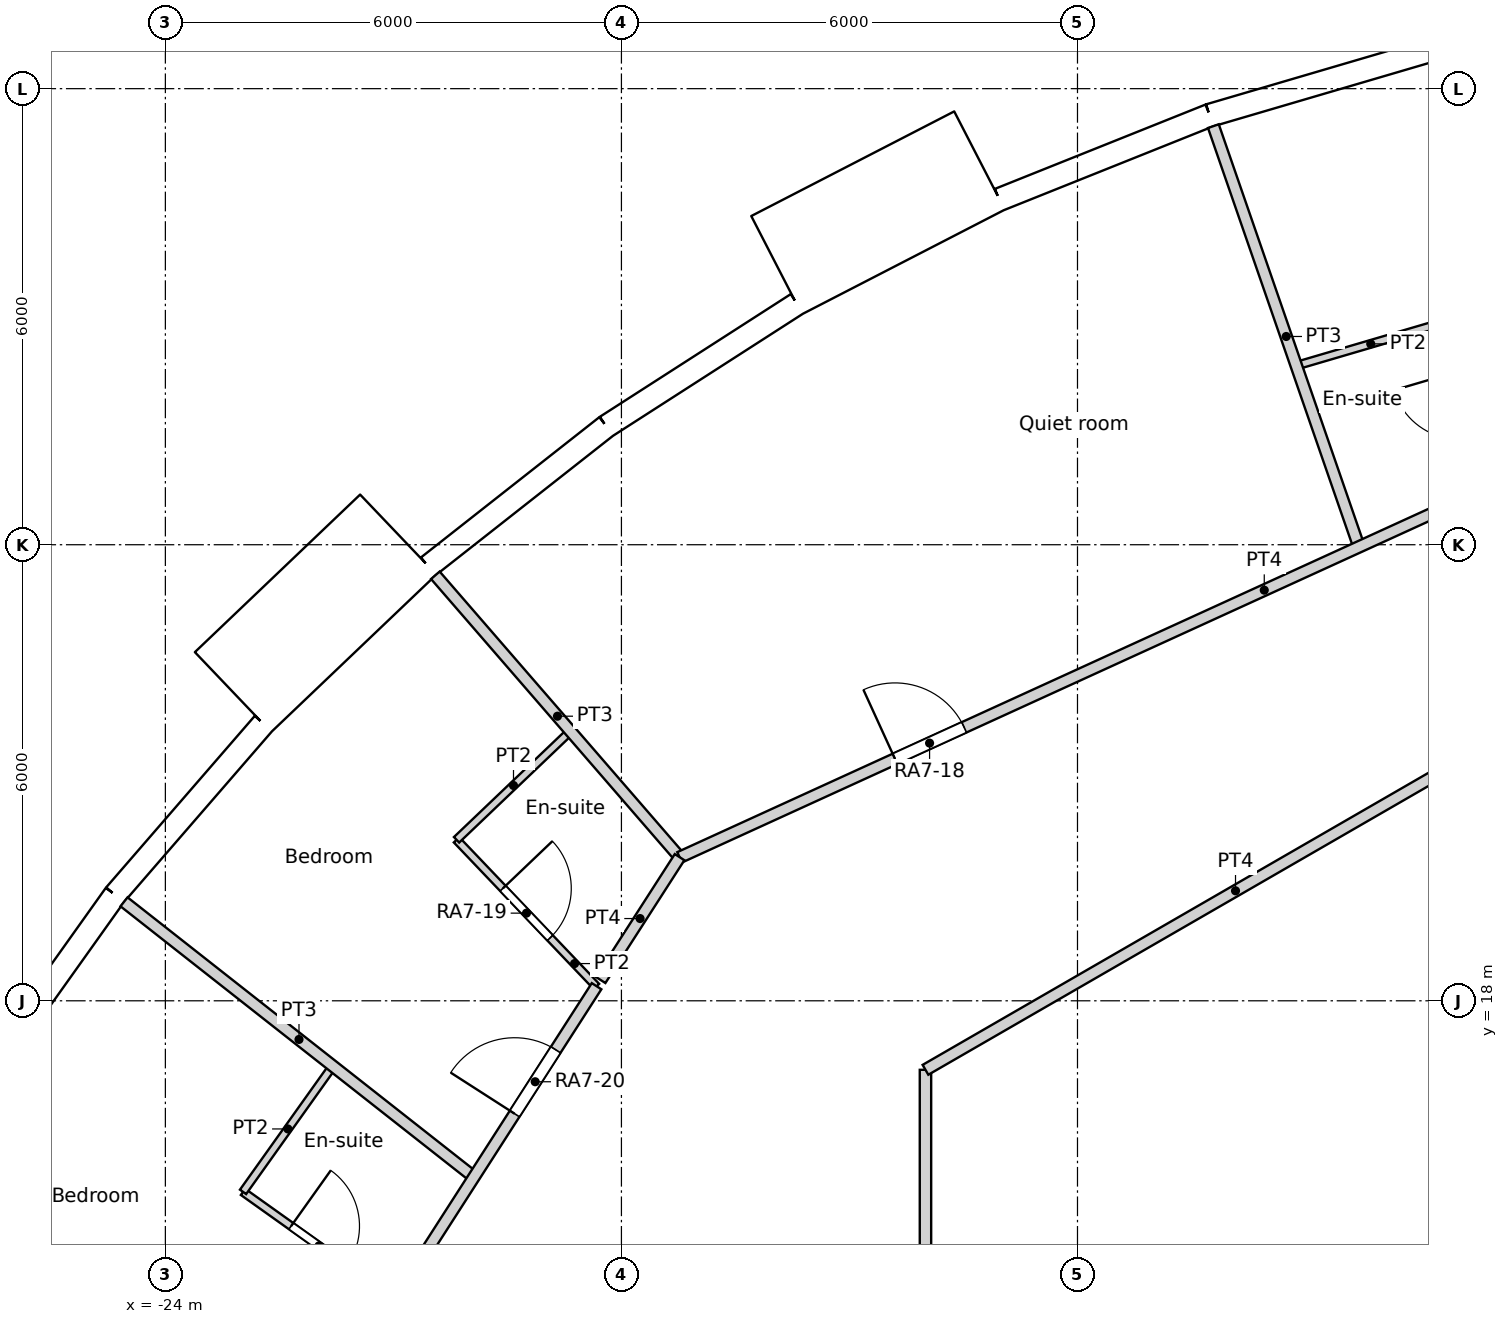
"""IFC4 building model, lengths in metres.
Left out: names, types, materials, properties, quantities, classifications, styles, units other than length and angle.
Written with IfcOpenShell. Run it as: python <this file> out.ifc"""

import sys

from ifc_helpers import new_model, si_unit, direction, frame, frame_2d, origin, origin_2d, place, context, subcontext, project, spatial, rectangle, circle, extrude, element, fill, save


model = new_model("IFC4")
c1 = context("Model", 3, precision=1e-05, world=origin(), true_north=direction((0.0, 1.0)))
c2 = subcontext(c1, "Body", "Model", "MODEL_VIEW")
j1 = project(units=[si_unit("LENGTHUNIT", "METRE"), si_unit("PLANEANGLEUNIT", "RADIAN")], contexts=[c1])
p1 = place(None, origin())
s1 = spatial("IfcSite", under=j1, at=p1, CompositionType="ELEMENT")
p2 = place(p1, origin())
s2 = spatial("IfcBuilding", under=s1, at=p2, CompositionType="ELEMENT")
p3 = place(p2, frame((0.0, 0.0, 93.0)))
s3 = spatial("IfcBuildingStorey", under=s2, at=p3, CompositionType="ELEMENT", Elevation=93.0)
for number, where, z_axis, x_axis in (
    (1, (-9.902, 28.61, 0.0), (0.0, 0.0, 1.0), (1.0, 0.0, 0.0)),
    (2, (-15.137, 26.219, 0.0), (0.0, 0.0, 1.0), (1.0, 0.0, 0.0)),
    (3, (-19.826, 22.88, 0.0), (0.0, 0.0, 1.0), (1.0, 0.0, 0.0)),
    (4, (-23.797, 18.715, 0.0), (0.0, 0.0, 1.0), (1.0, 0.0, 0.0)),
):
    element("IfcColumn", number, at=place(p3, frame(where, z_axis=z_axis, x_axis=x_axis)), inside=s3, PredefinedType="COLUMN", context=c2, shape_type="SweptSolid", body=[
        extrude(circle(Radius=0.6, at=origin_2d()), origin(), (0.0, 0.0, 1.0), 3.6),
    ])
for number, where, z_axis, x_axis in (
    (5, (-7.04, 23.516, 0.0), (0.0, 0.0, 1.0), (1.0, 0.0, 0.0)),
    (6, (-12.274, 21.259, 0.0), (0.0, 0.0, 1.0), (1.0, 0.0, 0.0)),
    (7, (-16.846, 17.855, 0.0), (0.0, 0.0, 1.0), (1.0, 0.0, 0.0)),
):
    element("IfcColumn", number, at=place(p3, frame(where, z_axis=z_axis, x_axis=x_axis)), inside=s3, PredefinedType="COLUMN", context=c2, shape_type="SweptSolid", body=[
        extrude(circle(Radius=0.65, at=origin_2d()), origin(), (0.0, 0.0, 1.0), 3.6),
    ])
p4 = place(p3, frame((-9.411, 16.301, 0.0), z_axis=(0.0, 0.0, 1.0), x_axis=(1.0, 0.0, 0.0)))
e8 = element("IfcColumn", 8, at=p4, inside=s3, PredefinedType="COLUMN", context=c2, shape_type="SweptSolid", body=[
    extrude(circle(Radius=0.7, at=origin_2d()), origin(), (0.0, 0.0, 1.0), 3.6),
])
p5 = place(p3, frame((-4.567, 31.621, -0.45), z_axis=(0.0, 0.0, 1.0), x_axis=(-0.981921602273, -0.189288052949, 0.0)))
e9 = element("IfcWall", 9, at=p5, inside=s3, PredefinedType="ELEMENTEDWALL", context=c2, shape_type="SweptSolid", body=[
    extrude(rectangle(XDim=3.0, YDim=1.45, at=frame_2d((1.5, 0.0))), origin(), (0.0, 0.0, 1.0), 3.6),
])
p6 = place(p5, frame((1.5, 0.0, 2.0)))
e10 = element("IfcOpeningElement", 10, at=p6, cuts=e9, PredefinedType="OPENING", context=c2, shape_type="SweptSolid", body=[
    extrude(circle(Radius=0.9, at=origin_2d()), frame((0.0, 0.735, 0.0), z_axis=(0.0, -1.0, 0.0), x_axis=(1.0, 0.0, 0.0)), (0.0, 0.0, 1.0), 1.47),
])
p7 = place(p3, frame((-7.403, 30.488, 0.0), z_axis=(0.0, 0.0, 1.0), x_axis=(-0.959501085144, -0.281704930036, 0.0)))
e11 = element("IfcWall", 11, at=p7, inside=s3, PredefinedType="SOLIDWALL", context=c2, shape_type="SweptSolid", body=[
    extrude(rectangle(XDim=2.979, YDim=0.3, at=frame_2d((1.49, 0.0))), origin(), (0.0, 0.0, 1.0), 3.15),
])
p8 = place(p7, frame((1.49, 0.0, 1.55)))
e12 = element("IfcOpeningElement", 12, at=p8, cuts=e11, PredefinedType="OPENING", context=c2, shape_type="SweptSolid", body=[
    extrude(circle(Radius=0.9, at=origin_2d()), frame((0.0, 0.16, 0.0), z_axis=(0.0, -1.0, 0.0), x_axis=(1.0, 0.0, 0.0)), (0.0, 0.0, 1.0), 0.32),
])
p9 = place(p3, frame((-10.261, 29.649, 0.0), z_axis=(0.0, 0.0, 1.0), x_axis=(-0.928374947, -0.371644935098, 0.0)))
e13 = element("IfcWall", 13, at=p9, inside=s3, PredefinedType="SOLIDWALL", context=c2, shape_type="SweptSolid", body=[
    extrude(rectangle(XDim=2.98, YDim=0.3, at=frame_2d((1.49, 0.0))), origin(), (0.0, 0.0, 1.0), 3.15),
])
p10 = place(p9, frame((1.49, 0.0, 1.55)))
e14 = element("IfcOpeningElement", 14, at=p10, cuts=e13, PredefinedType="OPENING", context=c2, shape_type="SweptSolid", body=[
    extrude(circle(Radius=0.9, at=origin_2d()), frame((0.0, 0.16, 0.0), z_axis=(0.0, -1.0, 0.0), x_axis=(1.0, 0.0, 0.0)), (0.0, 0.0, 1.0), 0.32),
])
p11 = place(p3, frame((-13.291, 29.053, -0.45), z_axis=(0.0, 0.0, 1.0), x_axis=(-0.888858064689, -0.458182650083, 0.0)))
e15 = element("IfcWall", 15, at=p11, inside=s3, PredefinedType="ELEMENTEDWALL", context=c2, shape_type="SweptSolid", body=[
    extrude(rectangle(XDim=3.0, YDim=1.45, at=frame_2d((1.5, 0.0))), origin(), (0.0, 0.0, 1.0), 3.6),
])
p12 = place(p11, frame((1.5, 0.0, 2.0)))
e16 = element("IfcOpeningElement", 16, at=p12, cuts=e15, PredefinedType="OPENING", context=c2, shape_type="SweptSolid", body=[
    extrude(circle(Radius=0.9, at=origin_2d()), frame((0.0, 0.735, 0.0), z_axis=(0.0, -1.0, 0.0), x_axis=(1.0, 0.0, 0.0)), (0.0, 0.0, 1.0), 1.47),
])
p13 = place(p3, frame((-15.692, 27.168, 0.0), z_axis=(0.0, 0.0, 1.0), x_axis=(-0.841260995538, -0.54062920508, 0.0)))
e17 = element("IfcWall", 17, at=p13, inside=s3, PredefinedType="SOLIDWALL", context=c2, shape_type="SweptSolid", body=[
    extrude(rectangle(XDim=2.979, YDim=0.3, at=frame_2d((1.49, 0.0))), origin(), (0.0, 0.0, 1.0), 3.15),
])
p14 = place(p13, frame((1.49, 0.0, 1.55)))
e18 = element("IfcOpeningElement", 18, at=p14, cuts=e17, PredefinedType="OPENING", context=c2, shape_type="SweptSolid", body=[
    extrude(circle(Radius=0.9, at=origin_2d()), frame((0.0, 0.16, 0.0), z_axis=(0.0, -1.0, 0.0), x_axis=(1.0, 0.0, 0.0)), (0.0, 0.0, 1.0), 0.32),
])
p15 = place(p3, frame((-18.199, 25.557, 0.0), z_axis=(0.0, 0.0, 1.0), x_axis=(-0.786053834673, -0.618158045322, 0.0)))
e19 = element("IfcWall", 19, at=p15, inside=s3, PredefinedType="SOLIDWALL", context=c2, shape_type="SweptSolid", body=[
    extrude(rectangle(XDim=2.979, YDim=0.3, at=frame_2d((1.49, 0.0))), origin(), (0.0, 0.0, 1.0), 3.15),
])
p16 = place(p15, frame((1.49, 0.0, 1.55)))
e20 = element("IfcOpeningElement", 20, at=p16, cuts=e19, PredefinedType="OPENING", context=c2, shape_type="SweptSolid", body=[
    extrude(circle(Radius=0.9, at=origin_2d()), frame((0.0, 0.16, 0.0), z_axis=(0.0, -1.0, 0.0), x_axis=(1.0, 0.0, 0.0)), (0.0, 0.0, 1.0), 0.32),
])
p17 = place(p3, frame((-20.938, 24.132, -0.45), z_axis=(0.0, 0.0, 1.0), x_axis=(-0.723712023899, -0.690102098579, 0.0)))
e21 = element("IfcWall", 21, at=p17, inside=s3, PredefinedType="ELEMENTEDWALL", context=c2, shape_type="SweptSolid", body=[
    extrude(rectangle(XDim=3.0, YDim=1.45, at=frame_2d((1.5, 0.0))), origin(), (0.0, 0.0, 1.0), 3.6),
])
p18 = place(p17, frame((1.5, 0.0, 2.0)))
e22 = element("IfcOpeningElement", 22, at=p18, cuts=e21, PredefinedType="OPENING", context=c2, shape_type="SweptSolid", body=[
    extrude(circle(Radius=0.9, at=origin_2d()), frame((0.0, 0.735, 0.0), z_axis=(0.0, -1.0, 0.0), x_axis=(1.0, 0.0, 0.0)), (0.0, 0.0, 1.0), 1.47),
])
p19 = place(p3, frame((-22.711, 21.646, 0.0), z_axis=(0.0, 0.0, 1.0), x_axis=(-0.654830712471, -0.755775587066, 0.0)))
e23 = element("IfcWall", 23, at=p19, inside=s3, PredefinedType="SOLIDWALL", context=c2, shape_type="SweptSolid", body=[
    extrude(rectangle(XDim=2.98, YDim=0.3, at=frame_2d((1.49, 0.0))), origin(), (0.0, 0.0, 1.0), 3.15),
])
p20 = place(p19, frame((1.49, 0.0, 1.55)))
e24 = element("IfcOpeningElement", 24, at=p20, cuts=e23, PredefinedType="OPENING", context=c2, shape_type="SweptSolid", body=[
    extrude(circle(Radius=0.9, at=origin_2d()), frame((0.0, 0.16, 0.0), z_axis=(0.0, -1.0, 0.0), x_axis=(1.0, 0.0, 0.0)), (0.0, 0.0, 1.0), 0.32),
])
p21 = place(p3, frame((-24.662, 19.394, 0.0), z_axis=(0.0, 0.0, 1.0), x_axis=(-0.580113774115, -0.814535456, 0.0)))
e25 = element("IfcWall", 25, at=p21, inside=s3, PredefinedType="SOLIDWALL", context=c2, shape_type="SweptSolid", body=[
    extrude(rectangle(XDim=2.98, YDim=0.3, at=frame_2d((1.49, 0.0))), origin(), (0.0, 0.0, 1.0), 3.15),
])
p22 = place(p21, frame((1.49, 0.0, 1.55)))
e26 = element("IfcOpeningElement", 26, at=p22, cuts=e25, PredefinedType="OPENING", context=c2, shape_type="SweptSolid", body=[
    extrude(circle(Radius=0.9, at=origin_2d()), frame((0.0, 0.16, 0.0), z_axis=(0.0, -1.0, 0.0), x_axis=(1.0, 0.0, 0.0)), (0.0, 0.0, 1.0), 0.32),
])
p23 = place(p3, frame((-14.0, 17.092, 0.0), z_axis=(0.0, 0.0, 1.0), x_axis=(0.86602719091, 0.499996904595, 0.0)))
e27 = element("IfcWall", 27, at=p23, inside=s3, PredefinedType="PARTITIONING", context=c2, shape_type="SweptSolid", body=[
    extrude(rectangle(XDim=9.42, YDim=0.15, at=frame_2d((4.71, 0.0))), origin(), (0.0, 0.0, 1.0), 3.15),
])
p24 = place(p3, frame((-14.0, 11.8, 0.0), z_axis=(0.0, 0.0, 1.0), x_axis=(0.0, 1.0, 0.0)))
e28 = element("IfcWall", 28, at=p24, inside=s3, PredefinedType="PARTITIONING", context=c2, shape_type="SweptSolid", body=[
    extrude(rectangle(XDim=5.292, YDim=0.15, at=frame_2d((2.646, 0.0))), origin(), (0.0, 0.0, 1.0), 3.15),
])
p25 = place(p3, frame((-17.234, 19.888, 0.0), z_axis=(0.0, 0.0, 1.0), x_axis=(0.90953867323, 0.415619299238, 0.0)))
e29 = element("IfcWall", 29, at=p25, inside=s3, PredefinedType="PARTITIONING", context=c2, shape_type="SweptSolid", body=[
    extrude(rectangle(XDim=14.829, YDim=0.15, at=frame_2d((7.415, 0.0))), origin(), (0.0, 0.0, 1.0), 3.15),
])
p26 = place(p25, frame((12.797, 0.0, 0.0)))
e30 = element("IfcOpeningElement", 30, at=p26, cuts=e29, PredefinedType="OPENING", context=c2, shape_type="SweptSolid", body=[
    extrude(rectangle(XDim=1.0, YDim=2.1, at=frame_2d((0.5, 1.05))), frame((0.0, 0.075, 0.0), z_axis=(0.0, -1.0, 0.0), x_axis=(1.0, 0.0, 0.0)), (0.0, 0.0, 1.0), 0.15),
])
p27 = place(p25, frame((3.115, 0.0, 0.0)))
e31 = element("IfcOpeningElement", 31, at=p27, cuts=e29, PredefinedType="OPENING", context=c2, shape_type="SweptSolid", body=[
    extrude(rectangle(XDim=1.0, YDim=2.04, at=frame_2d((0.5, 1.02))), frame((0.0, 0.075, 0.0), z_axis=(0.0, -1.0, 0.0), x_axis=(1.0, 0.0, 0.0)), (0.0, 0.0, 1.0), 0.15),
])
p28 = place(p3, frame((-18.274, 18.274, 0.0), z_axis=(0.0, 0.0, 1.0), x_axis=(0.540751168176, 0.841182604502, 0.0)))
e32 = element("IfcWall", 32, at=p28, inside=s3, PredefinedType="PARTITIONING", context=c2, shape_type="SweptSolid", body=[
    extrude(rectangle(XDim=1.921, YDim=0.15, at=frame_2d((0.96, 0.0))), origin(), (0.0, 0.0, 1.0), 3.15),
])
p29 = place(p3, frame((-25.251, 7.414, 0.0), z_axis=(0.0, 0.0, 1.0), x_axis=(0.540498462047, 0.84134500208, 0.0)))
e33 = element("IfcWall", 33, at=p29, inside=s3, PredefinedType="PARTITIONING", context=c2, shape_type="SweptSolid", body=[
    extrude(rectangle(XDim=12.811, YDim=0.15, at=frame_2d((6.405, 0.0))), origin(), (0.0, 0.0, 1.0), 3.15),
])
p30 = place(p29, frame((10.817, 0.0, 0.0)))
e34 = element("IfcOpeningElement", 34, at=p30, cuts=e33, PredefinedType="OPENING", context=c2, shape_type="SweptSolid", body=[
    extrude(rectangle(XDim=1.0, YDim=2.1, at=frame_2d((0.5, 1.05))), frame((0.0, 0.075, 0.0), z_axis=(0.0, -1.0, 0.0), x_axis=(1.0, 0.0, 0.0)), (0.0, 0.0, 1.0), 0.15),
])
p31 = place(p29, frame((5.603, 0.0, 0.0)))
e35 = element("IfcOpeningElement", 35, at=p31, cuts=e33, PredefinedType="OPENING", context=c2, shape_type="SweptSolid", body=[
    extrude(rectangle(XDim=1.0, YDim=2.1, at=frame_2d((0.5, 1.05))), frame((0.0, 0.075, 0.0), z_axis=(0.0, -1.0, 0.0), x_axis=(1.0, 0.0, 0.0)), (0.0, 0.0, 1.0), 0.15),
])
p32 = place(p3, frame((-9.121, 26.355, 0.0), z_axis=(0.0, 0.0, 1.0), x_axis=(0.95948923736, 0.281745281045, 0.0)))
e36 = element("IfcWall", 36, at=p32, inside=s3, PredefinedType="PARTITIONING", context=c2, shape_type="SweptSolid", body=[
    extrude(rectangle(XDim=2.041, YDim=0.1, at=frame_2d((1.021, 0.0))), origin(), (0.0, 0.0, 1.0), 3.15),
])
p33 = place(p3, frame((-10.212, 29.507, 0.0), z_axis=(0.0, 0.0, 1.0), x_axis=(0.327061884856, -0.945002922469, 0.0)))
e37 = element("IfcWall", 37, at=p33, inside=s3, PredefinedType="PARTITIONING", context=c2, shape_type="SweptSolid", body=[
    extrude(rectangle(XDim=5.857, YDim=0.15, at=frame_2d((2.928, 0.0))), origin(), (0.0, 0.0, 1.0), 3.15),
])
p34 = place(p3, frame((-20.448, 23.598, 0.0), z_axis=(0.0, 0.0, 1.0), x_axis=(0.654900226821, -0.755715351776, 0.0)))
e38 = element("IfcWall", 38, at=p34, inside=s3, PredefinedType="PARTITIONING", context=c2, shape_type="SweptSolid", body=[
    extrude(rectangle(XDim=4.906, YDim=0.15, at=frame_2d((2.453, 0.0))), origin(), (0.0, 0.0, 1.0), 3.15),
])
p35 = place(p3, frame((-20.169, 20.118, 0.0), z_axis=(0.0, 0.0, 1.0), x_axis=(0.723537557066, 0.690285016145, 0.0)))
e39 = element("IfcWall", 39, at=p35, inside=s3, PredefinedType="PARTITIONING", context=c2, shape_type="SweptSolid", body=[
    extrude(rectangle(XDim=2.071, YDim=0.1, at=frame_2d((1.035, 0.0))), origin(), (0.0, 0.0, 1.0), 3.15),
])
p36 = place(p3, frame((-20.169, 20.118, 0.0), z_axis=(0.0, 0.0, 1.0), x_axis=(0.690011756227, -0.723798159896, 0.0)))
e40 = element("IfcWall", 40, at=p36, inside=s3, PredefinedType="PARTITIONING", context=c2, shape_type="SweptSolid", body=[
    extrude(rectangle(XDim=2.667, YDim=0.1, at=frame_2d((1.333, 0.0))), origin(), (0.0, 0.0, 1.0), 3.15),
])
p37 = place(p36, frame((0.883, 0.0, 0.0)))
e41 = element("IfcOpeningElement", 41, at=p37, cuts=e40, PredefinedType="OPENING", context=c2, shape_type="SweptSolid", body=[
    extrude(rectangle(XDim=0.9, YDim=2.04, at=frame_2d((0.45, 1.02))), frame((0.0, 0.05, 0.0), z_axis=(0.0, -1.0, 0.0), x_axis=(1.0, 0.0, 0.0)), (0.0, 0.0, 1.0), 0.1),
])
p38 = place(p3, frame((-24.544, 19.302, 0.0), z_axis=(0.0, 0.0, 1.0), x_axis=(0.786034767432, -0.618182290581, 0.0)))
e42 = element("IfcWall", 42, at=p38, inside=s3, PredefinedType="PARTITIONING", context=c2, shape_type="SweptSolid", body=[
    extrude(rectangle(XDim=5.857, YDim=0.15, at=frame_2d((2.929, 0.0))), origin(), (0.0, 0.0, 1.0), 3.15),
])
p39 = place(p3, frame((-22.978, 15.486, 0.0), z_axis=(0.0, 0.0, 1.0), x_axis=(0.580283748447, 0.814414373208, 0.0)))
e43 = element("IfcWall", 43, at=p39, inside=s3, PredefinedType="PARTITIONING", context=c2, shape_type="SweptSolid", body=[
    extrude(rectangle(XDim=2.033, YDim=0.1, at=frame_2d((1.017, 0.0))), origin(), (0.0, 0.0, 1.0), 3.15),
])
p40 = place(p3, frame((-22.978, 15.486, 0.0), z_axis=(0.0, 0.0, 1.0), x_axis=(0.814519517834, -0.580136152181, 0.0)))
e44 = element("IfcWall", 44, at=p40, inside=s3, PredefinedType="PARTITIONING", context=c2, shape_type="SweptSolid", body=[
    extrude(rectangle(XDim=2.453, YDim=0.1, at=frame_2d((1.227, 0.0))), origin(), (0.0, 0.0, 1.0), 3.15),
])
p41 = place(p40, frame((0.776, 0.0, 0.0)))
e45 = element("IfcOpeningElement", 45, at=p41, cuts=e44, PredefinedType="OPENING", context=c2, shape_type="SweptSolid", body=[
    extrude(rectangle(XDim=0.9, YDim=2.04, at=frame_2d((0.45, 1.02))), frame((0.0, 0.05, 0.0), z_axis=(0.0, -1.0, 0.0), x_axis=(1.0, 0.0, 0.0)), (0.0, 0.0, 1.0), 0.1),
])
p42 = place(p8, origin())
e46 = element("IfcWindow", 46, at=p42, inside=s3, PartitioningType="SINGLE_PANEL", PredefinedType="WINDOW", context=c2, shape_type="SweptSolid", body=[
    extrude(circle(Radius=0.9, at=origin_2d()), frame((0.0, 0.12, 0.0), z_axis=(0.0, -1.0, 0.0), x_axis=(1.0, 0.0, 0.0)), (0.0, 0.0, 1.0), 0.1),
])
fill(e12, e46)
p43 = place(p10, origin())
e47 = element("IfcWindow", 47, at=p43, inside=s3, PartitioningType="SINGLE_PANEL", PredefinedType="WINDOW", context=c2, shape_type="SweptSolid", body=[
    extrude(circle(Radius=0.9, at=origin_2d()), frame((0.0, 0.12, 0.0), z_axis=(0.0, -1.0, 0.0), x_axis=(1.0, 0.0, 0.0)), (0.0, 0.0, 1.0), 0.1),
])
fill(e14, e47)
p44 = place(p12, origin())
e48 = element("IfcWindow", 48, at=p44, inside=s3, PartitioningType="SINGLE_PANEL", PredefinedType="WINDOW", context=c2, shape_type="SweptSolid", body=[
    extrude(circle(Radius=0.9, at=origin_2d()), frame((0.0, 0.695, 0.0), z_axis=(0.0, -1.0, 0.0), x_axis=(1.0, 0.0, 0.0)), (0.0, 0.0, 1.0), 0.1),
])
fill(e16, e48)
p45 = place(p14, origin())
e49 = element("IfcWindow", 49, at=p45, inside=s3, PartitioningType="SINGLE_PANEL", PredefinedType="WINDOW", context=c2, shape_type="SweptSolid", body=[
    extrude(circle(Radius=0.9, at=origin_2d()), frame((0.0, 0.12, 0.0), z_axis=(0.0, -1.0, 0.0), x_axis=(1.0, 0.0, 0.0)), (0.0, 0.0, 1.0), 0.1),
])
fill(e18, e49)
p46 = place(p16, origin())
e50 = element("IfcWindow", 50, at=p46, inside=s3, PartitioningType="SINGLE_PANEL", PredefinedType="WINDOW", context=c2, shape_type="SweptSolid", body=[
    extrude(circle(Radius=0.9, at=origin_2d()), frame((0.0, 0.12, 0.0), z_axis=(0.0, -1.0, 0.0), x_axis=(1.0, 0.0, 0.0)), (0.0, 0.0, 1.0), 0.1),
])
fill(e20, e50)
p47 = place(p18, origin())
e51 = element("IfcWindow", 51, at=p47, inside=s3, PartitioningType="SINGLE_PANEL", PredefinedType="WINDOW", context=c2, shape_type="SweptSolid", body=[
    extrude(circle(Radius=0.9, at=origin_2d()), frame((0.0, 0.695, 0.0), z_axis=(0.0, -1.0, 0.0), x_axis=(1.0, 0.0, 0.0)), (0.0, 0.0, 1.0), 0.1),
])
fill(e22, e51)
p48 = place(p20, origin())
e52 = element("IfcWindow", 52, at=p48, inside=s3, PartitioningType="SINGLE_PANEL", PredefinedType="WINDOW", context=c2, shape_type="SweptSolid", body=[
    extrude(circle(Radius=0.9, at=origin_2d()), frame((0.0, 0.12, 0.0), z_axis=(0.0, -1.0, 0.0), x_axis=(1.0, 0.0, 0.0)), (0.0, 0.0, 1.0), 0.1),
])
fill(e24, e52)
p49 = place(p22, origin())
e53 = element("IfcWindow", 53, at=p49, inside=s3, PartitioningType="SINGLE_PANEL", PredefinedType="WINDOW", context=c2, shape_type="SweptSolid", body=[
    extrude(circle(Radius=0.9, at=origin_2d()), frame((0.0, 0.12, 0.0), z_axis=(0.0, -1.0, 0.0), x_axis=(1.0, 0.0, 0.0)), (0.0, 0.0, 1.0), 0.1),
])
fill(e26, e53)
p50 = place(p27, origin())
e54 = element("IfcDoor", 54, at=p50, inside=s3, OperationType="SINGLE_SWING_LEFT", PredefinedType="DOOR", context=c2, shape_type="SweptSolid", body=[
    extrude(rectangle(XDim=1.0, YDim=2.04, at=frame_2d((0.5, 1.02))), frame((0.0, 0.025, 0.0), z_axis=(0.0, -1.0, 0.0), x_axis=(1.0, 0.0, 0.0)), (0.0, 0.0, 1.0), 0.05),
])
fill(e31, e54)
p51 = place(p37, origin())
e55 = element("IfcDoor", 55, at=p51, inside=s3, OperationType="SINGLE_SWING_LEFT", PredefinedType="DOOR", context=c2, shape_type="SweptSolid", body=[
    extrude(rectangle(XDim=0.9, YDim=2.04, at=frame_2d((0.45, 1.02))), frame((0.0, 0.025, 0.0), z_axis=(0.0, -1.0, 0.0), x_axis=(1.0, 0.0, 0.0)), (0.0, 0.0, 1.0), 0.05),
])
fill(e41, e55)
p52 = place(p30, origin())
e56 = element("IfcDoor", 56, at=p52, inside=s3, OperationType="SINGLE_SWING_LEFT", PredefinedType="DOOR", context=c2, shape_type="SweptSolid", body=[
    extrude(rectangle(XDim=1.0, YDim=2.1, at=frame_2d((0.5, 1.05))), frame((0.0, 0.025, 0.0), z_axis=(0.0, -1.0, 0.0), x_axis=(1.0, 0.0, 0.0)), (0.0, 0.0, 1.0), 0.05),
])
fill(e34, e56)
p53 = place(p41, origin())
e57 = element("IfcDoor", 57, at=p53, inside=s3, OperationType="SINGLE_SWING_LEFT", PredefinedType="DOOR", context=c2, shape_type="SweptSolid", body=[
    extrude(rectangle(XDim=0.9, YDim=2.04, at=frame_2d((0.45, 1.02))), frame((0.0, 0.025, 0.0), z_axis=(0.0, -1.0, 0.0), x_axis=(1.0, 0.0, 0.0)), (0.0, 0.0, 1.0), 0.05),
])
fill(e45, e57)
save(model, sys.argv[1])
